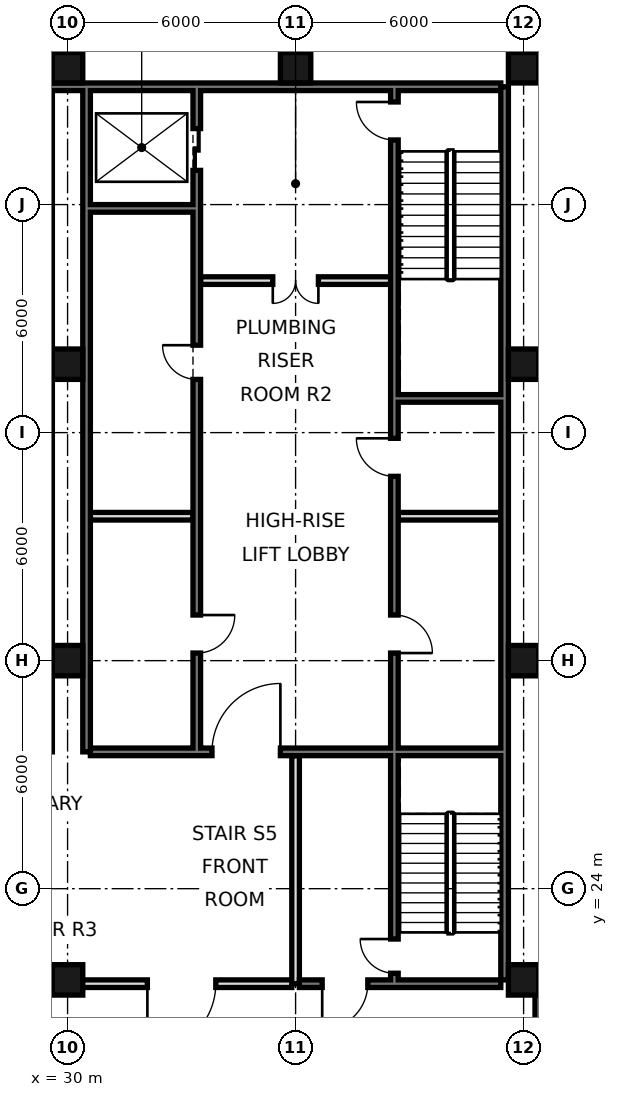
"""IFC4 building model, lengths in metres.
Left out: names, types, materials, properties, quantities, classifications, styles, units other than length and angle.
Written with IfcOpenShell. Run it as: python <this file> out.ifc"""

import sys

from ifc_helpers import new_model, si_unit, direction, frame, frame_2d, origin, origin_2d, place, context, subcontext, project, spatial, rectangle, hollow_rectangle, extrude, element, fill, save


model = new_model("IFC4")
c1 = context("Model", 3, precision=1e-05, world=origin(), true_north=direction((0.0, 1.0)))
c2 = subcontext(c1, "Body", "Model", "MODEL_VIEW")
j1 = project(units=[si_unit("LENGTHUNIT", "METRE"), si_unit("PLANEANGLEUNIT", "RADIAN")], contexts=[c1])
p1 = place(None, origin())
s1 = spatial("IfcSite", under=j1, at=p1, CompositionType="ELEMENT")
p2 = place(p1, origin())
s2 = spatial("IfcBuilding", under=s1, at=p2, CompositionType="ELEMENT")
p3 = place(p2, frame((0.0, 0.0, -9.0)))
s3 = spatial("IfcBuildingStorey", under=s2, at=p3, CompositionType="ELEMENT", Elevation=-9.0)
for number, where, z_axis, x_axis in (
    (1, (30.0, 21.6, 0.0), (0.0, 0.0, 1.0), (1.0, 0.0, 0.0)),
    (2, (30.0, 30.0, 0.0), (0.0, 0.0, 1.0), (1.0, 0.0, 0.0)),
    (3, (30.0, 37.8, 0.0), (0.0, 0.0, 1.0), (1.0, 0.0, 0.0)),
    (4, (30.0, 45.6, 0.0), (0.0, 0.0, 1.0), (1.0, 0.0, 0.0)),
    (5, (36.0, 45.6, 0.0), (0.0, 0.0, 1.0), (1.0, 0.0, 0.0)),
    (6, (42.0, 21.6, 0.0), (0.0, 0.0, 1.0), (1.0, 0.0, 0.0)),
    (7, (42.0, 30.0, 0.0), (0.0, 0.0, 1.0), (1.0, 0.0, 0.0)),
    (8, (42.0, 37.8, 0.0), (0.0, 0.0, 1.0), (1.0, 0.0, 0.0)),
    (9, (42.0, 45.6, 0.0), (0.0, 0.0, 1.0), (1.0, 0.0, 0.0)),
):
    element("IfcColumn", number, at=place(p3, frame(where, z_axis=z_axis, x_axis=x_axis)), inside=s3, PredefinedType="COLUMN", context=c2, shape_type="SweptSolid", body=[
        extrude(hollow_rectangle(XDim=0.8, YDim=0.8, WallThickness=0.07, at=origin_2d()), origin(), (0.0, 0.0, 1.0), 4.5),
    ])
p4 = place(p3, frame((42.4, 17.7, 0.0), z_axis=(0.0, 0.0, 1.0), x_axis=(0.0, 1.0, 0.0)))
e10 = element("IfcWall", 10, at=p4, inside=s3, PredefinedType="SOLIDWALL", context=c2, shape_type="SweptSolid", body=[
    extrude(rectangle(XDim=3.9, YDim=0.2, at=frame_2d((1.95, 0.0))), origin(), (0.0, 0.0, 1.0), 4.14),
])
p5 = place(p3, frame((41.5, 21.6, 0.0), z_axis=(0.0, 0.0, 1.0), x_axis=(0.0, 1.0, 0.0)))
e11 = element("IfcWall", 11, at=p5, inside=s3, PredefinedType="SOLIDWALL", context=c2, shape_type="SweptSolid", body=[
    extrude(rectangle(XDim=23.5, YDim=0.2, at=frame_2d((11.75, 0.0))), origin(), (0.0, 0.0, 1.0), 4.14),
])
p6 = place(p3, frame((6.6, 45.1, 0.0), z_axis=(0.0, 0.0, 1.0), x_axis=(1.0, 0.0, 0.0)))
e12 = element("IfcWall", 12, at=p6, inside=s3, PredefinedType="SOLIDWALL", context=c2, shape_type="SweptSolid", body=[
    extrude(rectangle(XDim=34.8, YDim=0.2, at=frame_2d((17.4, 0.0))), origin(), (0.0, 0.0, 1.0), 4.14),
])
p7 = place(p3, frame((30.5, 27.6, 0.0), z_axis=(0.0, 0.0, 1.0), x_axis=(0.0, 1.0, 0.0)))
e13 = element("IfcWall", 13, at=p7, inside=s3, PredefinedType="SOLIDWALL", context=c2, shape_type="SweptSolid", body=[
    extrude(rectangle(XDim=17.5, YDim=0.2, at=frame_2d((8.75, 0.0))), origin(), (0.0, 0.0, 1.0), 4.14),
])
p8 = place(p3, frame((12.1, 21.5, 0.0), z_axis=(0.0, 0.0, 1.0), x_axis=(1.0, 0.0, 0.0)))
e14 = element("IfcWall", 14, at=p8, inside=s3, PredefinedType="SOLIDWALL", context=c2, shape_type="SweptSolid", body=[
    extrude(rectangle(XDim=23.8, YDim=0.2, at=frame_2d((11.9, 0.0))), origin(), (0.0, 0.0, 1.0), 3.04),
])
p9 = place(p8, frame((2.0, 0.0, 0.0)))
e15 = element("IfcOpeningElement", 15, at=p9, cuts=e14, PredefinedType="OPENING", context=c2, shape_type="SweptSolid", body=[
    extrude(rectangle(XDim=1.8, YDim=2.1, at=frame_2d((0.9, 1.05))), frame((0.0, 0.11, 0.0), z_axis=(0.0, -1.0, 0.0), x_axis=(1.0, 0.0, 0.0)), (0.0, 0.0, 1.0), 0.22),
])
p10 = place(p8, frame((11.0, 0.0, 0.0)))
e16 = element("IfcOpeningElement", 16, at=p10, cuts=e14, PredefinedType="OPENING", context=c2, shape_type="SweptSolid", body=[
    extrude(rectangle(XDim=1.8, YDim=2.1, at=frame_2d((0.9, 1.05))), frame((0.0, 0.11, 0.0), z_axis=(0.0, -1.0, 0.0), x_axis=(1.0, 0.0, 0.0)), (0.0, 0.0, 1.0), 0.22),
])
p11 = place(p8, frame((20.0, 0.0, 0.0)))
e17 = element("IfcOpeningElement", 17, at=p11, cuts=e14, PredefinedType="OPENING", context=c2, shape_type="SweptSolid", body=[
    extrude(rectangle(XDim=1.8, YDim=2.1, at=frame_2d((0.9, 1.05))), frame((0.0, 0.11, 0.0), z_axis=(0.0, -1.0, 0.0), x_axis=(1.0, 0.0, 0.0)), (0.0, 0.0, 1.0), 0.22),
])
p12 = place(p3, frame((33.4, 27.7, 0.0), z_axis=(0.0, 0.0, 1.0), x_axis=(0.0, 1.0, 0.0)))
e18 = element("IfcWall", 18, at=p12, inside=s3, PredefinedType="SOLIDWALL", context=c2, shape_type="SweptSolid", body=[
    extrude(rectangle(XDim=17.3, YDim=0.2, at=frame_2d((8.65, 0.0))), origin(), (0.0, 0.0, 1.0), 3.04),
])
p13 = place(p12, frame((15.2, 0.0, 0.0)))
e19 = element("IfcOpeningElement", 19, at=p13, cuts=e18, PredefinedType="OPENING", context=c2, shape_type="SweptSolid", body=[
    extrude(rectangle(XDim=1.1, YDim=2.1, at=frame_2d((0.55, 1.05))), frame((0.0, 0.11, 0.0), z_axis=(0.0, -1.0, 0.0), x_axis=(1.0, 0.0, 0.0)), (0.0, 0.0, 1.0), 0.22),
])
p14 = place(p12, frame((2.5, 0.0, 0.0)))
e20 = element("IfcOpeningElement", 20, at=p14, cuts=e18, PredefinedType="OPENING", context=c2, shape_type="SweptSolid", body=[
    extrude(rectangle(XDim=1.0, YDim=2.1, at=frame_2d((0.5, 1.05))), frame((0.0, 0.11, 0.0), z_axis=(0.0, -1.0, 0.0), x_axis=(1.0, 0.0, 0.0)), (0.0, 0.0, 1.0), 0.22),
])
p15 = place(p12, frame((9.7, 0.0, 0.0)))
e21 = element("IfcOpeningElement", 21, at=p15, cuts=e18, PredefinedType="OPENING", context=c2, shape_type="SweptSolid", body=[
    extrude(rectangle(XDim=0.9, YDim=2.1, at=frame_2d((0.45, 1.05))), frame((0.0, 0.11, 0.0), z_axis=(0.0, -1.0, 0.0), x_axis=(1.0, 0.0, 0.0)), (0.0, 0.0, 1.0), 0.22),
])
p16 = place(p3, frame((36.0, 21.5, 0.0), z_axis=(0.0, 0.0, 1.0), x_axis=(0.0, 1.0, 0.0)))
e22 = element("IfcWall", 22, at=p16, inside=s3, PredefinedType="PARTITIONING", context=c2, shape_type="SweptSolid", body=[
    extrude(rectangle(XDim=6.0, YDim=0.2, at=frame_2d((3.0, 0.0))), origin(), (0.0, 0.0, 1.0), 3.04),
])
p17 = place(p3, frame((38.6, 21.5, 0.0), z_axis=(0.0, 0.0, 1.0), x_axis=(0.0, 1.0, 0.0)))
e23 = element("IfcWall", 23, at=p17, inside=s3, PredefinedType="SOLIDWALL", context=c2, shape_type="SweptSolid", body=[
    extrude(rectangle(XDim=23.5, YDim=0.2, at=frame_2d((11.75, 0.0))), origin(), (0.0, 0.0, 1.0), 3.04),
])
p18 = place(p17, frame((8.7, 0.0, 0.0)))
e24 = element("IfcOpeningElement", 24, at=p18, cuts=e23, PredefinedType="OPENING", context=c2, shape_type="SweptSolid", body=[
    extrude(rectangle(XDim=1.0, YDim=2.1, at=frame_2d((0.5, 1.05))), frame((0.0, 0.11, 0.0), z_axis=(0.0, -1.0, 0.0), x_axis=(1.0, 0.0, 0.0)), (0.0, 0.0, 1.0), 0.22),
])
p19 = place(p17, frame((13.35, 0.0, 0.0)))
e25 = element("IfcOpeningElement", 25, at=p19, cuts=e23, PredefinedType="OPENING", context=c2, shape_type="SweptSolid", body=[
    extrude(rectangle(XDim=1.0, YDim=2.1, at=frame_2d((0.5, 1.05))), frame((0.0, 0.11, 0.0), z_axis=(0.0, -1.0, 0.0), x_axis=(1.0, 0.0, 0.0)), (0.0, 0.0, 1.0), 0.22),
])
p20 = place(p17, frame((22.2, 0.0, 0.0)))
e26 = element("IfcOpeningElement", 26, at=p20, cuts=e23, PredefinedType="OPENING", context=c2, shape_type="SweptSolid", body=[
    extrude(rectangle(XDim=1.0, YDim=2.1, at=frame_2d((0.5, 1.05))), frame((0.0, 0.11, 0.0), z_axis=(0.0, -1.0, 0.0), x_axis=(1.0, 0.0, 0.0)), (0.0, 0.0, 1.0), 0.22),
])
p21 = place(p17, frame((0.275, 0.0, 0.0)))
e27 = element("IfcOpeningElement", 27, at=p21, cuts=e23, PredefinedType="OPENING", context=c2, shape_type="SweptSolid", body=[
    extrude(rectangle(XDim=0.9, YDim=2.1, at=frame_2d((0.45, 1.05))), frame((0.0, 0.11, 0.0), z_axis=(0.0, -1.0, 0.0), x_axis=(1.0, 0.0, 0.0)), (0.0, 0.0, 1.0), 0.22),
])
p22 = place(p3, frame((36.1, 21.5, 0.0), z_axis=(0.0, 0.0, 1.0), x_axis=(1.0, 0.0, 0.0)))
e28 = element("IfcWall", 28, at=p22, inside=s3, PredefinedType="SOLIDWALL", context=c2, shape_type="SweptSolid", body=[
    extrude(rectangle(XDim=5.3, YDim=0.2, at=frame_2d((2.65, 0.0))), origin(), (0.0, 0.0, 1.0), 3.04),
])
p23 = place(p22, frame((0.6, 0.0, 0.0)))
e29 = element("IfcOpeningElement", 29, at=p23, cuts=e28, PredefinedType="OPENING", context=c2, shape_type="SweptSolid", body=[
    extrude(rectangle(XDim=1.2, YDim=2.1, at=frame_2d((0.6, 1.05))), frame((0.0, 0.11, 0.0), z_axis=(0.0, -1.0, 0.0), x_axis=(1.0, 0.0, 0.0)), (0.0, 0.0, 1.0), 0.22),
])
p24 = place(p3, frame((30.6, 27.6, 0.0), z_axis=(0.0, 0.0, 1.0), x_axis=(1.0, 0.0, 0.0)))
e30 = element("IfcWall", 30, at=p24, inside=s3, PredefinedType="SOLIDWALL", context=c2, shape_type="SweptSolid", body=[
    extrude(rectangle(XDim=10.8, YDim=0.2, at=frame_2d((5.4, 0.0))), origin(), (0.0, 0.0, 1.0), 4.14),
])
p25 = place(p24, frame((3.2, 0.0, 0.0)))
e31 = element("IfcOpeningElement", 31, at=p25, cuts=e30, PredefinedType="OPENING", context=c2, shape_type="SweptSolid", body=[
    extrude(rectangle(XDim=1.8, YDim=2.1, at=frame_2d((0.9, 1.05))), frame((0.0, 0.11, 0.0), z_axis=(0.0, -1.0, 0.0), x_axis=(1.0, 0.0, 0.0)), (0.0, 0.0, 1.0), 0.22),
])
p26 = place(p3, frame((30.6, 33.8, 0.0), z_axis=(0.0, 0.0, 1.0), x_axis=(1.0, 0.0, 0.0)))
e32 = element("IfcWall", 32, at=p26, inside=s3, PredefinedType="SOLIDWALL", context=c2, shape_type="SweptSolid", body=[
    extrude(rectangle(XDim=2.7, YDim=0.2, at=frame_2d((1.35, 0.0))), origin(), (0.0, 0.0, 1.0), 4.14),
])
p27 = place(p3, frame((38.7, 33.8, 0.0), z_axis=(0.0, 0.0, 1.0), x_axis=(1.0, 0.0, 0.0)))
e33 = element("IfcWall", 33, at=p27, inside=s3, PredefinedType="PARTITIONING", context=c2, shape_type="SweptSolid", body=[
    extrude(rectangle(XDim=2.7, YDim=0.2, at=frame_2d((1.35, 0.0))), origin(), (0.0, 0.0, 1.0), 4.14),
])
p28 = place(p3, frame((38.7, 36.9, 0.0), z_axis=(0.0, 0.0, 1.0), x_axis=(1.0, 0.0, 0.0)))
e34 = element("IfcWall", 34, at=p28, inside=s3, PredefinedType="SOLIDWALL", context=c2, shape_type="SweptSolid", body=[
    extrude(rectangle(XDim=2.7, YDim=0.2, at=frame_2d((1.35, 0.0))), origin(), (0.0, 0.0, 1.0), 4.14),
])
p29 = place(p3, frame((33.5, 40.0, 0.0), z_axis=(0.0, 0.0, 1.0), x_axis=(1.0, 0.0, 0.0)))
e35 = element("IfcWall", 35, at=p29, inside=s3, PredefinedType="PARTITIONING", context=c2, shape_type="SweptSolid", body=[
    extrude(rectangle(XDim=5.0, YDim=0.2, at=frame_2d((2.5, 0.0))), origin(), (0.0, 0.0, 1.0), 4.14),
])
p30 = place(p29, frame((1.9, 0.0, 0.0)))
e36 = element("IfcOpeningElement", 36, at=p30, cuts=e35, PredefinedType="OPENING", context=c2, shape_type="SweptSolid", body=[
    extrude(rectangle(XDim=1.2, YDim=2.1, at=frame_2d((0.6, 1.05))), frame((0.0, 0.11, 0.0), z_axis=(0.0, -1.0, 0.0), x_axis=(1.0, 0.0, 0.0)), (0.0, 0.0, 1.0), 0.22),
])
p31 = place(p3, frame((30.6, 41.9, 0.0), z_axis=(0.0, 0.0, 1.0), x_axis=(1.0, 0.0, 0.0)))
e37 = element("IfcWall", 37, at=p31, inside=s3, PredefinedType="SOLIDWALL", context=c2, shape_type="SweptSolid", body=[
    extrude(rectangle(XDim=2.7, YDim=0.2, at=frame_2d((1.35, 0.0))), origin(), (0.0, 0.0, 1.0), 4.14),
])
p32 = place(p11, frame((1.8, 0.0, 0.0), z_axis=(0.0, 0.0, 1.0), x_axis=(-1.0, 0.0, 0.0)))
e38 = element("IfcDoor", 38, at=p32, inside=s3, OperationType="SINGLE_SWING_RIGHT", PredefinedType="DOOR", context=c2, shape_type="SweptSolid", body=[
    extrude(rectangle(XDim=1.8, YDim=2.1, at=frame_2d((0.9, 1.05))), frame((0.0, 0.025, 0.0), z_axis=(0.0, -1.0, 0.0), x_axis=(1.0, 0.0, 0.0)), (0.0, 0.0, 1.0), 0.05),
])
fill(e17, e38)
p33 = place(p23, frame((1.2, 0.0, 0.0), z_axis=(0.0, 0.0, 1.0), x_axis=(-1.0, 0.0, 0.0)))
e39 = element("IfcDoor", 39, at=p33, inside=s3, OperationType="SINGLE_SWING_RIGHT", PredefinedType="DOOR", context=c2, shape_type="SweptSolid", body=[
    extrude(rectangle(XDim=1.2, YDim=2.1, at=frame_2d((0.6, 1.05))), frame((0.0, 0.025, 0.0), z_axis=(0.0, -1.0, 0.0), x_axis=(1.0, 0.0, 0.0)), (0.0, 0.0, 1.0), 0.05),
])
fill(e29, e39)
p34 = place(p25, frame((1.8, 0.0, 0.0), z_axis=(0.0, 0.0, 1.0), x_axis=(-1.0, 0.0, 0.0)))
e40 = element("IfcDoor", 40, at=p34, inside=s3, OperationType="SINGLE_SWING_LEFT", PredefinedType="DOOR", context=c2, shape_type="SweptSolid", body=[
    extrude(rectangle(XDim=1.8, YDim=2.1, at=frame_2d((0.9, 1.05))), frame((0.0, 0.025, 0.0), z_axis=(0.0, -1.0, 0.0), x_axis=(1.0, 0.0, 0.0)), (0.0, 0.0, 1.0), 0.05),
])
fill(e31, e40)
p35 = place(p30, frame((1.2, 0.0, 0.0), z_axis=(0.0, 0.0, 1.0), x_axis=(-1.0, 0.0, 0.0)))
e41 = element("IfcDoor", 41, at=p35, inside=s3, OperationType="DOUBLE_DOOR_SINGLE_SWING", PredefinedType="DOOR", context=c2, shape_type="SweptSolid", body=[
    extrude(rectangle(XDim=1.2, YDim=2.1, at=frame_2d((0.6, 1.05))), frame((0.0, 0.025, 0.0), z_axis=(0.0, -1.0, 0.0), x_axis=(1.0, 0.0, 0.0)), (0.0, 0.0, 1.0), 0.05),
])
fill(e36, e41)
p36 = place(p13, origin())
e42 = element("IfcDoor", 42, at=p36, inside=s3, OperationType="DOUBLE_DOOR_SLIDING", PredefinedType="DOOR", context=c2, shape_type="SweptSolid", body=[
    extrude(rectangle(XDim=1.1, YDim=2.1, at=frame_2d((0.55, 1.05))), frame((0.0, 0.025, 0.0), z_axis=(0.0, -1.0, 0.0), x_axis=(1.0, 0.0, 0.0)), (0.0, 0.0, 1.0), 0.05),
])
fill(e19, e42)
p37 = place(p18, frame((1.0, 0.0, 0.0), z_axis=(0.0, 0.0, 1.0), x_axis=(-1.0, 0.0, 0.0)))
e43 = element("IfcDoor", 43, at=p37, inside=s3, OperationType="SINGLE_SWING_RIGHT", PredefinedType="DOOR", context=c2, shape_type="SweptSolid", body=[
    extrude(rectangle(XDim=1.0, YDim=2.1, at=frame_2d((0.5, 1.05))), frame((0.0, 0.025, 0.0), z_axis=(0.0, -1.0, 0.0), x_axis=(1.0, 0.0, 0.0)), (0.0, 0.0, 1.0), 0.05),
])
fill(e24, e43)
p38 = place(p19, frame((1.0, 0.0, 0.0), z_axis=(0.0, 0.0, 1.0), x_axis=(-1.0, 0.0, 0.0)))
e44 = element("IfcDoor", 44, at=p38, inside=s3, OperationType="SINGLE_SWING_LEFT", PredefinedType="DOOR", context=c2, shape_type="SweptSolid", body=[
    extrude(rectangle(XDim=1.0, YDim=2.1, at=frame_2d((0.5, 1.05))), frame((0.0, 0.025, 0.0), z_axis=(0.0, -1.0, 0.0), x_axis=(1.0, 0.0, 0.0)), (0.0, 0.0, 1.0), 0.05),
])
fill(e25, e44)
p39 = place(p14, origin())
e45 = element("IfcDoor", 45, at=p39, inside=s3, OperationType="SINGLE_SWING_RIGHT", PredefinedType="DOOR", context=c2, shape_type="SweptSolid", body=[
    extrude(rectangle(XDim=1.0, YDim=2.1, at=frame_2d((0.5, 1.05))), frame((0.0, 0.025, 0.0), z_axis=(0.0, -1.0, 0.0), x_axis=(1.0, 0.0, 0.0)), (0.0, 0.0, 1.0), 0.05),
])
fill(e20, e45)
p40 = place(p20, frame((1.0, 0.0, 0.0), z_axis=(0.0, 0.0, 1.0), x_axis=(-1.0, 0.0, 0.0)))
e46 = element("IfcDoor", 46, at=p40, inside=s3, OperationType="SINGLE_SWING_LEFT", PredefinedType="DOOR", context=c2, shape_type="SweptSolid", body=[
    extrude(rectangle(XDim=1.0, YDim=2.1, at=frame_2d((0.5, 1.05))), frame((0.0, 0.025, 0.0), z_axis=(0.0, -1.0, 0.0), x_axis=(1.0, 0.0, 0.0)), (0.0, 0.0, 1.0), 0.05),
])
fill(e26, e46)
p41 = place(p21, frame((0.9, 0.0, 0.0), z_axis=(0.0, 0.0, 1.0), x_axis=(-1.0, 0.0, 0.0)))
e47 = element("IfcDoor", 47, at=p41, inside=s3, OperationType="SINGLE_SWING_LEFT", PredefinedType="DOOR", context=c2, shape_type="SweptSolid", body=[
    extrude(rectangle(XDim=0.9, YDim=2.1, at=frame_2d((0.45, 1.05))), frame((0.0, 0.025, 0.0), z_axis=(0.0, -1.0, 0.0), x_axis=(1.0, 0.0, 0.0)), (0.0, 0.0, 1.0), 0.05),
])
fill(e27, e47)
p42 = place(p15, frame((0.9, 0.0, 0.0), z_axis=(0.0, 0.0, 1.0), x_axis=(-1.0, 0.0, 0.0)))
e48 = element("IfcDoor", 48, at=p42, inside=s3, OperationType="SINGLE_SWING_LEFT", PredefinedType="DOOR", context=c2, shape_type="SweptSolid", body=[
    extrude(rectangle(XDim=0.9, YDim=2.1, at=frame_2d((0.45, 1.05))), frame((0.0, 0.025, 0.0), z_axis=(0.0, -1.0, 0.0), x_axis=(1.0, 0.0, 0.0)), (0.0, 0.0, 1.0), 0.05),
])
fill(e21, e48)
save(model, sys.argv[1])
